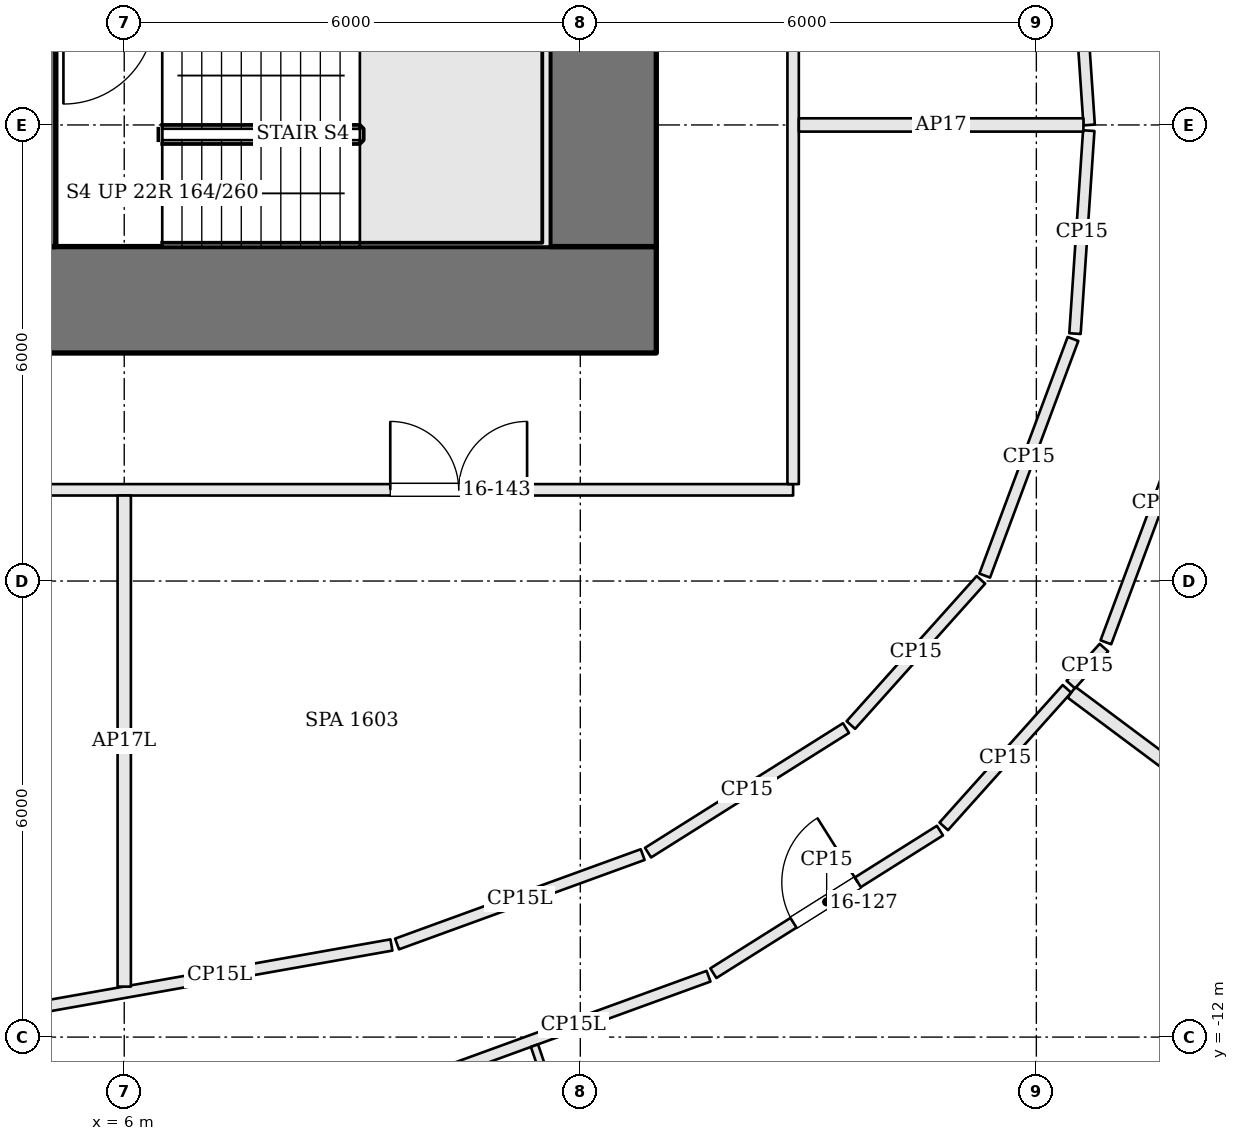
"""IFC4 building model, lengths in metres.
Left out: names, types, materials, properties, quantities, classifications, styles, units other than length and angle.
Written with IfcOpenShell. Run it as: python <this file> out.ifc"""

import sys

from ifc_helpers import new_model, si_unit, direction, frame, frame_2d, origin, place, context, subcontext, project, spatial, rectangle, extrude, element, fill, save


model = new_model("IFC4")
c1 = context("Model", 3, precision=1e-05, world=origin(), true_north=direction((0.0, 1.0)))
c2 = subcontext(c1, "Body", "Model", "MODEL_VIEW")
j1 = project(units=[si_unit("LENGTHUNIT", "METRE"), si_unit("PLANEANGLEUNIT", "RADIAN")], contexts=[c1])
p1 = place(None, origin())
s1 = spatial("IfcSite", under=j1, at=p1, CompositionType="ELEMENT")
p2 = place(p1, origin())
s2 = spatial("IfcBuilding", under=s1, at=p2, CompositionType="ELEMENT")
p3 = place(p2, frame((0.0, 0.0, 73.5)))
s3 = spatial("IfcBuildingStorey", under=s2, at=p3, CompositionType="ELEMENT", Elevation=73.5)
p4 = place(p3, frame((-13.0, -2.3, 0.0), z_axis=(0.0, 0.0, 1.0), x_axis=(1.0, 0.0, 0.0)))
e1 = element("IfcWall", 1, at=p4, inside=s3, PredefinedType="SHEAR", context=c2, shape_type="SweptSolid", body=[
    extrude(rectangle(XDim=26.0, YDim=1.4, at=frame_2d((13.0, 0.0))), origin(), (0.0, 0.0, 1.0), 3.6),
])
p5 = place(p4, frame((8.825, 0.0, 0.0)))
e2 = element("IfcOpeningElement", 2, at=p5, cuts=e1, PredefinedType="OPENING", context=c2, shape_type="SweptSolid", body=[
    extrude(rectangle(XDim=1.0, YDim=2.1, at=frame_2d((0.5, 1.05))), frame((0.0, 0.71, 0.0), z_axis=(0.0, -1.0, 0.0), x_axis=(1.0, 0.0, 0.0)), (0.0, 0.0, 1.0), 1.42),
])
p6 = place(p4, frame((11.275, 0.0, 0.0)))
e3 = element("IfcOpeningElement", 3, at=p6, cuts=e1, PredefinedType="OPENING", context=c2, shape_type="SweptSolid", body=[
    extrude(rectangle(XDim=1.0, YDim=2.1, at=frame_2d((0.5, 1.05))), frame((0.0, 0.71, 0.0), z_axis=(0.0, -1.0, 0.0), x_axis=(1.0, 0.0, 0.0)), (0.0, 0.0, 1.0), 1.42),
])
p7 = place(p4, frame((13.475, 0.0, 0.0)))
e4 = element("IfcOpeningElement", 4, at=p7, cuts=e1, PredefinedType="OPENING", context=c2, shape_type="SweptSolid", body=[
    extrude(rectangle(XDim=0.7, YDim=2.1, at=frame_2d((0.35, 1.05))), frame((0.0, 0.71, 0.0), z_axis=(0.0, -1.0, 0.0), x_axis=(1.0, 0.0, 0.0)), (0.0, 0.0, 1.0), 1.42),
])
p8 = place(p4, frame((15.775, 0.0, 0.0)))
e5 = element("IfcOpeningElement", 5, at=p8, cuts=e1, PredefinedType="OPENING", context=c2, shape_type="SweptSolid", body=[
    extrude(rectangle(XDim=1.0, YDim=2.1, at=frame_2d((0.5, 1.05))), frame((0.0, 0.71, 0.0), z_axis=(0.0, -1.0, 0.0), x_axis=(1.0, 0.0, 0.0)), (0.0, 0.0, 1.0), 1.42),
])
p9 = place(p3, frame((12.3, -1.6, 0.0), z_axis=(0.0, 0.0, 1.0), x_axis=(0.0, 1.0, 0.0)))
e6 = element("IfcWall", 6, at=p9, inside=s3, PredefinedType="SHEAR", context=c2, shape_type="SweptSolid", body=[
    extrude(rectangle(XDim=12.2, YDim=1.4, at=frame_2d((6.1, 0.0))), origin(), (0.0, 0.0, 1.0), 3.6),
])
p10 = place(p9, frame((6.8, 0.0, 0.0)))
e7 = element("IfcOpeningElement", 7, at=p10, cuts=e6, PredefinedType="OPENING", context=c2, shape_type="SweptSolid", body=[
    extrude(rectangle(XDim=1.8, YDim=2.1, at=frame_2d((0.9, 1.05))), frame((0.0, 0.71, 0.0), z_axis=(0.0, -1.0, 0.0), x_axis=(1.0, 0.0, 0.0)), (0.0, 0.0, 1.0), 1.42),
])
p11 = place(p3, frame((4.975, 10.6, 0.0), z_axis=(0.0, 0.0, 1.0), x_axis=(0.0, -1.0, 0.0)))
e8 = element("IfcWall", 8, at=p11, inside=s3, PredefinedType="SOLIDWALL", context=c2, shape_type="SweptSolid", body=[
    extrude(rectangle(XDim=12.2, YDim=0.25, at=frame_2d((6.1, 0.0))), origin(), (0.0, 0.0, 1.0), 3.3),
])
p12 = place(p11, frame((4.65, 0.0, 0.0)))
e9 = element("IfcOpeningElement", 9, at=p12, cuts=e8, PredefinedType="OPENING", context=c2, shape_type="SweptSolid", body=[
    extrude(rectangle(XDim=1.2, YDim=2.1, at=frame_2d((0.6, 1.05))), frame((0.0, 0.135, 0.0), z_axis=(0.0, -1.0, 0.0), x_axis=(1.0, 0.0, 0.0)), (0.0, 0.0, 1.0), 0.27),
])
p13 = place(p3, frame((10.128, -12.494, 0.0), z_axis=(0.0, 0.0, 1.0), x_axis=(0.939720005412, 0.341944895309, 0.0)))
e10 = element("IfcWall", 10, at=p13, inside=s3, PredefinedType="PARTITIONING", context=c2, shape_type="SweptSolid", body=[
    extrude(rectangle(XDim=3.788, YDim=0.15, at=frame_2d((1.894, 0.0))), origin(), (0.0, 0.0, 1.0), 2.58),
])
p14 = place(p3, frame((13.751, -11.159, 0.0), z_axis=(0.0, 0.0, 1.0), x_axis=(0.846413381026, 0.532526420396, 0.0)))
e11 = element("IfcWall", 11, at=p14, inside=s3, PredefinedType="PARTITIONING", context=c2, shape_type="SweptSolid", body=[
    extrude(rectangle(XDim=3.522, YDim=0.15, at=frame_2d((1.761, 0.0))), origin(), (0.0, 0.0, 1.0), 2.684),
])
p15 = place(p14, frame((1.245, 0.0, 0.0)))
e12 = element("IfcOpeningElement", 12, at=p15, cuts=e11, PredefinedType="OPENING", context=c2, shape_type="SweptSolid", body=[
    extrude(rectangle(XDim=1.0, YDim=2.1, at=frame_2d((0.5, 1.05))), frame((0.0, 0.085, 0.0), z_axis=(0.0, -1.0, 0.0), x_axis=(1.0, 0.0, 0.0)), (0.0, 0.0, 1.0), 0.17),
])
p16 = place(p3, frame((16.781, -9.228, 0.0), z_axis=(0.0, 0.0, 1.0), x_axis=(0.667308710912, 0.744781232538, 0.0)))
e13 = element("IfcWall", 13, at=p16, inside=s3, PredefinedType="PARTITIONING", context=c2, shape_type="SweptSolid", body=[
    extrude(rectangle(XDim=2.43, YDim=0.15, at=frame_2d((1.215, 0.0))), origin(), (0.0, 0.0, 1.0), 2.684),
])
p17 = place(p3, frame((26.844, -13.716, 0.0), z_axis=(0.0, 0.0, 1.0), x_axis=(-0.801529984423, 0.597954583619, 0.0)))
e14 = element("IfcWall", 14, at=p17, inside=s3, PredefinedType="PARTITIONING", context=c2, shape_type="SweptSolid", body=[
    extrude(rectangle(XDim=10.456, YDim=0.175, at=frame_2d((5.228, 0.0))), origin(), (0.0, 0.0, 1.0), 2.798),
])
p18 = place(p3, frame((18.453, -7.362, 0.0), z_axis=(0.0, 0.0, 1.0), x_axis=(0.667330462125, 0.744761743325, 0.0)))
e15 = element("IfcWall", 15, at=p18, inside=s3, PredefinedType="PARTITIONING", context=c2, shape_type="SweptSolid", body=[
    extrude(rectangle(XDim=0.653, YDim=0.15, at=frame_2d((0.326, 0.0))), origin(), (0.0, 0.0, 1.0), 2.684),
])
p19 = place(p3, frame((18.915, -6.806, 0.0), z_axis=(0.0, 0.0, 1.0), x_axis=(0.349452792603, 0.936953972051, 0.0)))
e16 = element("IfcWall", 16, at=p19, inside=s3, PredefinedType="PARTITIONING", context=c2, shape_type="SweptSolid", body=[
    extrude(rectangle(XDim=3.925, YDim=0.15, at=frame_2d((1.962, 0.0))), origin(), (0.0, 0.0, 1.0), 2.684),
])
p20 = place(p3, frame((18.508, 2.742, 0.0), z_axis=(0.0, 0.0, 1.0), x_axis=(0.067774714774, -0.997700650515, 0.0)))
e17 = element("IfcWall", 17, at=p20, inside=s3, PredefinedType="PARTITIONING", context=c2, shape_type="SweptSolid", body=[
    extrude(rectangle(XDim=2.749, YDim=0.15, at=frame_2d((1.374, 0.0))), origin(), (0.0, 0.0, 1.0), 2.684),
])
p21 = place(p3, frame((18.689, -0.075, 0.0), z_axis=(0.0, 0.0, 1.0), x_axis=(-0.067687508044, -0.997706570718, 0.0)))
e18 = element("IfcWall", 18, at=p21, inside=s3, PredefinedType="PARTITIONING", context=c2, shape_type="SweptSolid", body=[
    extrude(rectangle(XDim=2.676, YDim=0.15, at=frame_2d((1.338, 0.0))), origin(), (0.0, 0.0, 1.0), 2.684),
])
p22 = place(p3, frame((18.482, -2.815, 0.0), z_axis=(0.0, 0.0, 1.0), x_axis=(-0.349448047934, -0.936955741642, 0.0)))
e19 = element("IfcWall", 19, at=p22, inside=s3, PredefinedType="PARTITIONING", context=c2, shape_type="SweptSolid", body=[
    extrude(rectangle(XDim=3.323, YDim=0.15, at=frame_2d((1.661, 0.0))), origin(), (0.0, 0.0, 1.0), 2.684),
])
p23 = place(p3, frame((17.271, -5.984, 0.0), z_axis=(0.0, 0.0, 1.0), x_axis=(-0.667301130907, -0.744788023997, 0.0)))
e20 = element("IfcWall", 20, at=p23, inside=s3, PredefinedType="PARTITIONING", context=c2, shape_type="SweptSolid", body=[
    extrude(rectangle(XDim=2.565, YDim=0.15, at=frame_2d((1.282, 0.0))), origin(), (0.0, 0.0, 1.0), 2.684),
])
p24 = place(p3, frame((15.496, -7.934, 0.0), z_axis=(0.0, 0.0, 1.0), x_axis=(-0.846358667139, -0.532613374371, 0.0)))
e21 = element("IfcWall", 21, at=p24, inside=s3, PredefinedType="PARTITIONING", context=c2, shape_type="SweptSolid", body=[
    extrude(rectangle(XDim=3.078, YDim=0.15, at=frame_2d((1.539, 0.0))), origin(), (0.0, 0.0, 1.0), 2.684),
])
p25 = place(p3, frame((12.821, -9.599, 0.0), z_axis=(0.0, 0.0, 1.0), x_axis=(-0.939712560326, -0.341965354921, 0.0)))
e22 = element("IfcWall", 22, at=p25, inside=s3, PredefinedType="PARTITIONING", context=c2, shape_type="SweptSolid", body=[
    extrude(rectangle(XDim=3.439, YDim=0.15, at=frame_2d((1.719, 0.0))), origin(), (0.0, 0.0, 1.0), 2.58),
])
p26 = place(p3, frame((9.515, -10.788, 0.0), z_axis=(0.0, 0.0, 1.0), x_axis=(-0.984662912103, -0.174467617423, 0.0)))
e23 = element("IfcWall", 23, at=p26, inside=s3, PredefinedType="PARTITIONING", context=c2, shape_type="SweptSolid", body=[
    extrude(rectangle(XDim=4.593, YDim=0.15, at=frame_2d((2.296, 0.0))), origin(), (0.0, 0.0, 1.0), 2.58),
])
p27 = place(p3, frame((-14.725, -4.8, 0.0), z_axis=(0.0, 0.0, 1.0), x_axis=(1.0, 0.0, 0.0)))
e24 = element("IfcWall", 24, at=p27, inside=s3, PredefinedType="PARTITIONING", context=c2, shape_type="SweptSolid", body=[
    extrude(rectangle(XDim=29.525, YDim=0.15, at=frame_2d((14.763, 0.0))), origin(), (0.0, 0.0, 1.0), 2.58),
])
p28 = place(p27, frame((3.425, 0.0, 0.0)))
e25 = element("IfcOpeningElement", 25, at=p28, cuts=e24, PredefinedType="OPENING", context=c2, shape_type="SweptSolid", body=[
    extrude(rectangle(XDim=1.8, YDim=2.1, at=frame_2d((0.9, 1.05))), frame((0.0, 0.085, 0.0), z_axis=(0.0, -1.0, 0.0), x_axis=(1.0, 0.0, 0.0)), (0.0, 0.0, 1.0), 0.17),
])
p29 = place(p27, frame((13.825, 0.0, 0.0)))
e26 = element("IfcOpeningElement", 26, at=p29, cuts=e24, PredefinedType="OPENING", context=c2, shape_type="SweptSolid", body=[
    extrude(rectangle(XDim=1.8, YDim=2.1, at=frame_2d((0.9, 1.05))), frame((0.0, 0.085, 0.0), z_axis=(0.0, -1.0, 0.0), x_axis=(1.0, 0.0, 0.0)), (0.0, 0.0, 1.0), 0.17),
])
p30 = place(p27, frame((24.225, 0.0, 0.0)))
e27 = element("IfcOpeningElement", 27, at=p30, cuts=e24, PredefinedType="OPENING", context=c2, shape_type="SweptSolid", body=[
    extrude(rectangle(XDim=1.8, YDim=2.1, at=frame_2d((0.9, 1.05))), frame((0.0, 0.085, 0.0), z_axis=(0.0, -1.0, 0.0), x_axis=(1.0, 0.0, 0.0)), (0.0, 0.0, 1.0), 0.17),
])
p31 = place(p3, frame((14.8, -4.725, 0.0), z_axis=(0.0, 0.0, 1.0), x_axis=(0.0, 1.0, 0.0)))
e28 = element("IfcWall", 28, at=p31, inside=s3, PredefinedType="PARTITIONING", context=c2, shape_type="SweptSolid", body=[
    extrude(rectangle(XDim=13.15, YDim=0.15, at=frame_2d((6.575, 0.0))), origin(), (0.0, 0.0, 1.0), 2.684),
])
p32 = place(p31, frame((8.438, 0.0, 0.0)))
e29 = element("IfcOpeningElement", 29, at=p32, cuts=e28, PredefinedType="OPENING", context=c2, shape_type="SweptSolid", body=[
    extrude(rectangle(XDim=1.0, YDim=2.1, at=frame_2d((0.5, 1.05))), frame((0.0, 0.085, 0.0), z_axis=(0.0, -1.0, 0.0), x_axis=(1.0, 0.0, 0.0)), (0.0, 0.0, 1.0), 0.17),
])
p33 = place(p3, frame((13.673, -18.876, 0.0), z_axis=(0.0, 0.0, 1.0), x_axis=(-0.318864359282, 0.947800358926, 0.0)))
e30 = element("IfcWall", 30, at=p33, inside=s3, PredefinedType="PARTITIONING", context=c2, shape_type="SweptSolid", body=[
    extrude(rectangle(XDim=7.136, YDim=0.1, at=frame_2d((3.568, 0.0))), origin(), (0.0, 0.0, 1.0), 2.784),
])
p34 = place(p33, frame((3.061, 0.0, 0.0)))
e31 = element("IfcOpeningElement", 31, at=p34, cuts=e30, PredefinedType="OPENING", context=c2, shape_type="SweptSolid", body=[
    extrude(rectangle(XDim=0.9, YDim=2.4, at=frame_2d((0.45, 1.2))), frame((0.0, 0.06, 0.0), z_axis=(0.0, -1.0, 0.0), x_axis=(1.0, 0.0, 0.0)), (0.0, 0.0, 1.0), 0.12),
])
p35 = place(p3, frame((6.0, -11.336, 0.0), z_axis=(0.0, 0.0, 1.0), x_axis=(0.0, 1.0, 0.0)))
e32 = element("IfcWall", 32, at=p35, inside=s3, PredefinedType="PARTITIONING", context=c2, shape_type="SweptSolid", body=[
    extrude(rectangle(XDim=6.461, YDim=0.175, at=frame_2d((3.23, 0.0))), origin(), (0.0, 0.0, 1.0), 2.28),
])
p36 = place(p3, frame((14.875, 0.0, 0.0), z_axis=(0.0, 0.0, 1.0), x_axis=(1.0, 0.0, 0.0)))
e33 = element("IfcWall", 33, at=p36, inside=s3, PredefinedType="PARTITIONING", context=c2, shape_type="SweptSolid", body=[
    extrude(rectangle(XDim=3.744, YDim=0.175, at=frame_2d((1.872, 0.0))), origin(), (0.0, 0.0, 1.0), 2.798),
])
p37 = place(p15, origin())
e34 = element("IfcDoor", 34, at=p37, inside=s3, OperationType="SINGLE_SWING_RIGHT", PredefinedType="DOOR", context=c2, shape_type="SweptSolid", body=[
    extrude(rectangle(XDim=1.0, YDim=2.1, at=frame_2d((0.5, 1.05))), frame((0.0, 0.025, 0.0), z_axis=(0.0, -1.0, 0.0), x_axis=(1.0, 0.0, 0.0)), (0.0, 0.0, 1.0), 0.05),
])
fill(e12, e34)
p38 = place(p30, origin())
e35 = element("IfcDoor", 35, at=p38, inside=s3, OperationType="DOUBLE_DOOR_SINGLE_SWING", PredefinedType="DOOR", context=c2, shape_type="SweptSolid", body=[
    extrude(rectangle(XDim=1.8, YDim=2.1, at=frame_2d((0.9, 1.05))), frame((0.0, 0.025, 0.0), z_axis=(0.0, -1.0, 0.0), x_axis=(1.0, 0.0, 0.0)), (0.0, 0.0, 1.0), 0.05),
])
fill(e27, e35)
save(model, sys.argv[1])
